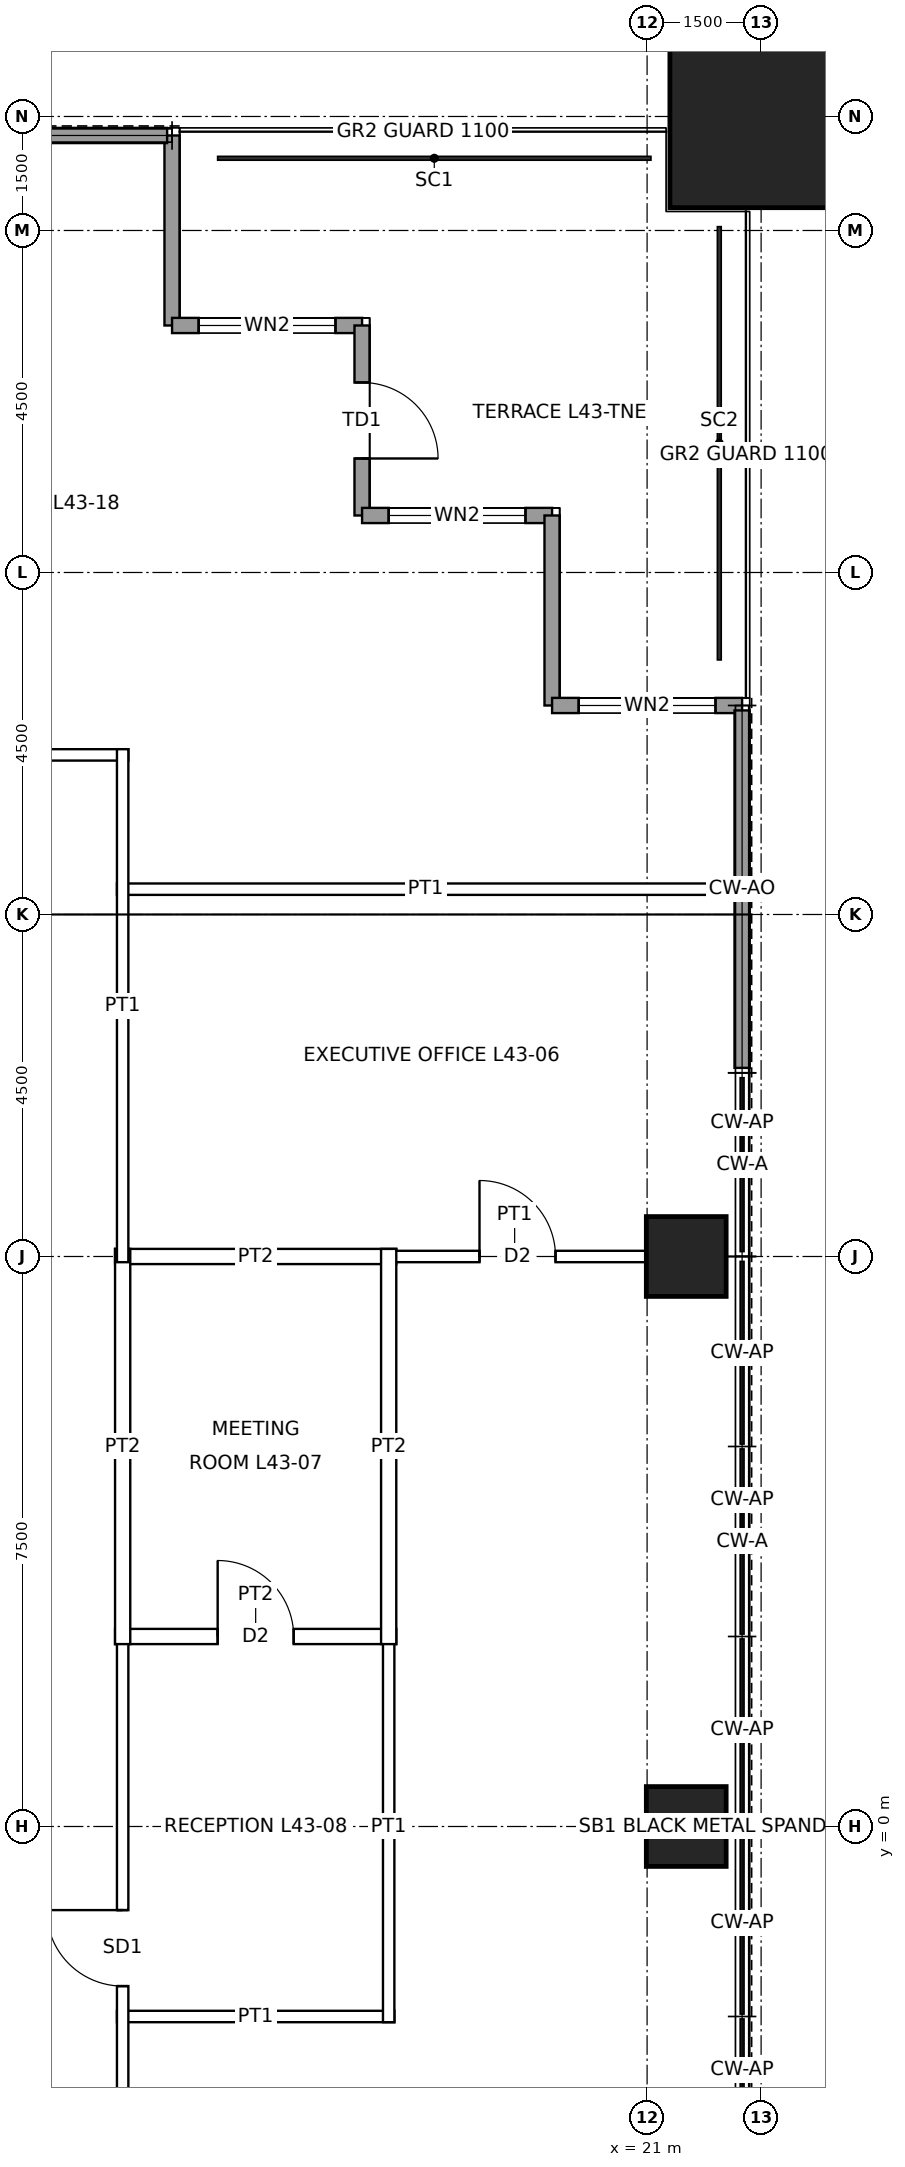
"""IFC4 building model, lengths in metres.
Left out: names, types, materials, properties, quantities, classifications, styles, units other than length and angle.
Written with IfcOpenShell. Run it as: python <this file> out.ifc"""

import sys

from ifc_helpers import new_model, si_unit, direction, frame, frame_2d, origin, origin_2d, place, context, subcontext, project, spatial, rectangle, hollow_rectangle, extrude, element, fill, save


model = new_model("IFC4")
c1 = context("Model", 3, precision=1e-05, world=origin(), true_north=direction((0.0, 1.0)))
c2 = subcontext(c1, "Body", "Model", "MODEL_VIEW")
j1 = project(units=[si_unit("LENGTHUNIT", "METRE"), si_unit("PLANEANGLEUNIT", "RADIAN")], contexts=[c1])
p1 = place(None, origin())
s1 = spatial("IfcSite", under=j1, at=p1, CompositionType="ELEMENT")
p2 = place(p1, origin())
s2 = spatial("IfcBuilding", under=s1, at=p2, CompositionType="ELEMENT")
p3 = place(p2, frame((0.0, 0.0, 205.9)))
s3 = spatial("IfcBuildingStorey", under=s2, at=p3, CompositionType="ELEMENT", Elevation=205.9)
p4 = place(p3, frame((22.5, 22.5, 0.0), z_axis=(0.0, 0.0, 1.0), x_axis=(1.0, 0.0, 0.0)))
e1 = element("IfcColumn", 1, at=p4, inside=s3, PredefinedType="COLUMN", context=c2, shape_type="SweptSolid", body=[
    extrude(hollow_rectangle(XDim=2.4, YDim=2.4, WallThickness=0.12, at=origin_2d()), origin(), (0.0, 0.0, 1.0), 4.0),
])
for number, where, z_axis, x_axis in (
    (2, (21.515, 7.5, 0.0), (0.0, 0.0, 1.0), (1.0, 0.0, 0.0)),
    (3, (21.515, 0.0, 0.0), (0.0, 0.0, 1.0), (1.0, 0.0, 0.0)),
):
    element("IfcColumn", number, at=place(p3, frame(where, z_axis=z_axis, x_axis=x_axis)), inside=s3, PredefinedType="COLUMN", context=c2, shape_type="SweptSolid", body=[
        extrude(hollow_rectangle(XDim=1.05, YDim=1.05, WallThickness=0.07, at=origin_2d()), origin(), (0.0, 0.0, 1.0), 4.0),
    ])
p5 = place(p3, frame((14.75, 22.25, 0.0), z_axis=(0.0, 0.0, 1.0), x_axis=(0.0, -1.0, 0.0)))
e4 = element("IfcWall", 4, at=p5, inside=s3, PredefinedType="SOLIDWALL", context=c2, shape_type="SweptSolid", body=[
    extrude(rectangle(XDim=2.5, YDim=0.2, at=frame_2d((1.25, 0.0))), origin(), (0.0, 0.0, 1.0), 3.85),
])
p6 = place(p3, frame((14.75, 19.75, 0.0), z_axis=(0.0, 0.0, 1.0), x_axis=(1.0, 0.0, 0.0)))
e5 = element("IfcWall", 5, at=p6, inside=s3, PredefinedType="SOLIDWALL", context=c2, shape_type="SweptSolid", body=[
    extrude(rectangle(XDim=2.5, YDim=0.2, at=frame_2d((1.25, 0.0))), origin(), (0.0, 0.0, 1.0), 3.85),
])
p7 = place(p6, frame((0.35, 0.0, 0.3)))
e6 = element("IfcOpeningElement", 6, at=p7, cuts=e5, PredefinedType="OPENING", context=c2, shape_type="SweptSolid", body=[
    extrude(rectangle(XDim=1.8, YDim=2.4, at=frame_2d((0.9, 1.2))), frame((0.0, 0.11, 0.0), z_axis=(0.0, -1.0, 0.0), x_axis=(1.0, 0.0, 0.0)), (0.0, 0.0, 1.0), 0.22),
])
p8 = place(p3, frame((17.25, 19.75, 0.0), z_axis=(0.0, 0.0, 1.0), x_axis=(0.0, -1.0, 0.0)))
e7 = element("IfcWall", 7, at=p8, inside=s3, PredefinedType="SOLIDWALL", context=c2, shape_type="SweptSolid", body=[
    extrude(rectangle(XDim=2.5, YDim=0.2, at=frame_2d((1.25, 0.0))), origin(), (0.0, 0.0, 1.0), 3.85),
])
p9 = place(p8, frame((0.75, 0.0, 0.0)))
e8 = element("IfcOpeningElement", 8, at=p9, cuts=e7, PredefinedType="OPENING", context=c2, shape_type="SweptSolid", body=[
    extrude(rectangle(XDim=1.0, YDim=2.4, at=frame_2d((0.5, 1.2))), frame((0.0, 0.11, 0.0), z_axis=(0.0, -1.0, 0.0), x_axis=(1.0, 0.0, 0.0)), (0.0, 0.0, 1.0), 0.22),
])
p10 = place(p3, frame((17.25, 17.25, 0.0), z_axis=(0.0, 0.0, 1.0), x_axis=(1.0, 0.0, 0.0)))
e9 = element("IfcWall", 9, at=p10, inside=s3, PredefinedType="SOLIDWALL", context=c2, shape_type="SweptSolid", body=[
    extrude(rectangle(XDim=2.5, YDim=0.2, at=frame_2d((1.25, 0.0))), origin(), (0.0, 0.0, 1.0), 3.85),
])
p11 = place(p10, frame((0.35, 0.0, 0.3)))
e10 = element("IfcOpeningElement", 10, at=p11, cuts=e9, PredefinedType="OPENING", context=c2, shape_type="SweptSolid", body=[
    extrude(rectangle(XDim=1.8, YDim=2.4, at=frame_2d((0.9, 1.2))), frame((0.0, 0.11, 0.0), z_axis=(0.0, -1.0, 0.0), x_axis=(1.0, 0.0, 0.0)), (0.0, 0.0, 1.0), 0.22),
])
p12 = place(p3, frame((19.75, 17.25, 0.0), z_axis=(0.0, 0.0, 1.0), x_axis=(0.0, -1.0, 0.0)))
e11 = element("IfcWall", 11, at=p12, inside=s3, PredefinedType="SOLIDWALL", context=c2, shape_type="SweptSolid", body=[
    extrude(rectangle(XDim=2.5, YDim=0.2, at=frame_2d((1.25, 0.0))), origin(), (0.0, 0.0, 1.0), 3.85),
])
p13 = place(p3, frame((19.75, 14.75, 0.0), z_axis=(0.0, 0.0, 1.0), x_axis=(1.0, 0.0, 0.0)))
e12 = element("IfcWall", 12, at=p13, inside=s3, PredefinedType="SOLIDWALL", context=c2, shape_type="SweptSolid", body=[
    extrude(rectangle(XDim=2.5, YDim=0.2, at=frame_2d((1.25, 0.0))), origin(), (0.0, 0.0, 1.0), 3.85),
])
p14 = place(p13, frame((0.35, 0.0, 0.3)))
e13 = element("IfcOpeningElement", 13, at=p14, cuts=e12, PredefinedType="OPENING", context=c2, shape_type="SweptSolid", body=[
    extrude(rectangle(XDim=1.8, YDim=2.4, at=frame_2d((0.9, 1.2))), frame((0.0, 0.11, 0.0), z_axis=(0.0, -1.0, 0.0), x_axis=(1.0, 0.0, 0.0)), (0.0, 0.0, 1.0), 0.22),
])
for number, where, z_axis, x_axis in (
    (14, (12.366, 22.25, 0.0), (0.0, 0.0, 1.0), (1.0, 0.0, 0.0)),
    (15, (22.25, 14.685, 0.0), (0.0, 0.0, 1.0), (0.0, -1.0, 0.0)),
    (16, (22.25, 12.301, 0.0), (0.0, 0.0, 1.0), (0.0, -1.0, 0.0)),
):
    element("IfcWall", number, at=place(p3, frame(where, z_axis=z_axis, x_axis=x_axis)), inside=s3, PredefinedType="SOLIDWALL", context=c2, shape_type="SweptSolid", body=[
        extrude(rectangle(XDim=2.319, YDim=0.2, at=frame_2d((1.16, 0.0))), origin(), (0.0, 0.0, 1.0), 3.85),
    ])
p15 = place(p3, frame((14.025, -2.5, 0.0), z_axis=(0.0, 0.0, 1.0), x_axis=(1.0, 0.0, 0.0)))
e17 = element("IfcWall", 17, at=p15, inside=s3, PredefinedType="PARTITIONING", context=c2, shape_type="SweptSolid", body=[
    extrude(rectangle(XDim=3.65, YDim=0.15, at=frame_2d((1.825, 0.0))), origin(), (0.0, 0.0, 1.0), 3.85),
])
p16 = place(p3, frame((14.0, 2.5, 0.0), z_axis=(0.0, 0.0, 1.0), x_axis=(1.0, 0.0, 0.0)))
e18 = element("IfcWall", 18, at=p16, inside=s3, PredefinedType="PARTITIONING", context=c2, shape_type="SweptSolid", body=[
    extrude(rectangle(XDim=3.7, YDim=0.2, at=frame_2d((1.85, 0.0))), origin(), (0.0, 0.0, 1.0), 3.85),
])
p17 = place(p16, frame((1.35, 0.0, 0.0)))
e19 = element("IfcOpeningElement", 19, at=p17, cuts=e18, PredefinedType="OPENING", context=c2, shape_type="SweptSolid", body=[
    extrude(rectangle(XDim=1.0, YDim=2.1, at=frame_2d((0.5, 1.05))), frame((0.0, 0.11, 0.0), z_axis=(0.0, -1.0, 0.0), x_axis=(1.0, 0.0, 0.0)), (0.0, 0.0, 1.0), 0.22),
])
p18 = place(p3, frame((14.0, 7.5, 0.0), z_axis=(0.0, 0.0, 1.0), x_axis=(1.0, 0.0, 0.0)))
e20 = element("IfcWall", 20, at=p18, inside=s3, PredefinedType="PARTITIONING", context=c2, shape_type="SweptSolid", body=[
    extrude(rectangle(XDim=3.7, YDim=0.2, at=frame_2d((1.85, 0.0))), origin(), (0.0, 0.0, 1.0), 3.238),
])
p19 = place(p3, frame((17.525, 7.5, 0.0), z_axis=(0.0, 0.0, 1.0), x_axis=(1.0, 0.0, 0.0)))
e21 = element("IfcWall", 21, at=p19, inside=s3, PredefinedType="PARTITIONING", context=c2, shape_type="SweptSolid", body=[
    extrude(rectangle(XDim=3.465, YDim=0.15, at=frame_2d((1.732, 0.0))), origin(), (0.0, 0.0, 1.0), 3.238),
])
p20 = place(p19, frame((1.27, 0.0, 0.0)))
e22 = element("IfcOpeningElement", 22, at=p20, cuts=e21, PredefinedType="OPENING", context=c2, shape_type="SweptSolid", body=[
    extrude(rectangle(XDim=1.0, YDim=2.1, at=frame_2d((0.5, 1.05))), frame((0.0, 0.085, 0.0), z_axis=(0.0, -1.0, 0.0), x_axis=(1.0, 0.0, 0.0)), (0.0, 0.0, 1.0), 0.17),
])
p21 = place(p3, frame((14.025, 12.333, 0.0), z_axis=(0.0, 0.0, 1.0), x_axis=(1.0, 0.0, 0.0)))
e23 = element("IfcWall", 23, at=p21, inside=s3, PredefinedType="PARTITIONING", context=c2, shape_type="SweptSolid", body=[
    extrude(rectangle(XDim=8.125, YDim=0.15, at=frame_2d((4.062, 0.0))), origin(), (0.0, 0.0, 1.0), 3.85),
])
p22 = place(p3, frame((-14.175, 14.1, 0.0), z_axis=(0.0, 0.0, 1.0), x_axis=(1.0, 0.0, 0.0)))
e24 = element("IfcWall", 24, at=p22, inside=s3, PredefinedType="PARTITIONING", context=c2, shape_type="SweptSolid", body=[
    extrude(rectangle(XDim=28.35, YDim=0.15, at=frame_2d((14.175, 0.0))), origin(), (0.0, 0.0, 1.0), 3.85),
])
p23 = place(p22, frame((13.675, 0.0, 0.0)))
e25 = element("IfcOpeningElement", 25, at=p23, cuts=e24, PredefinedType="OPENING", context=c2, shape_type="SweptSolid", body=[
    extrude(rectangle(XDim=1.0, YDim=2.4, at=frame_2d((0.5, 1.2))), frame((0.0, 0.085, 0.0), z_axis=(0.0, -1.0, 0.0), x_axis=(1.0, 0.0, 0.0)), (0.0, 0.0, 1.0), 0.17),
])
p24 = place(p22, frame((24.475, 0.0, 0.0)))
e26 = element("IfcOpeningElement", 26, at=p24, cuts=e24, PredefinedType="OPENING", context=c2, shape_type="SweptSolid", body=[
    extrude(rectangle(XDim=1.0, YDim=2.4, at=frame_2d((0.5, 1.2))), frame((0.0, 0.085, 0.0), z_axis=(0.0, -1.0, 0.0), x_axis=(1.0, 0.0, 0.0)), (0.0, 0.0, 1.0), 0.17),
])
p25 = place(p3, frame((14.1, -14.175, 0.0), z_axis=(0.0, 0.0, 1.0), x_axis=(0.0, 1.0, 0.0)))
e27 = element("IfcWall", 27, at=p25, inside=s3, PredefinedType="PARTITIONING", context=c2, shape_type="SweptSolid", body=[
    extrude(rectangle(XDim=16.75, YDim=0.15, at=frame_2d((8.375, 0.0))), origin(), (0.0, 0.0, 1.0), 3.85),
])
p26 = place(p25, frame((12.075, 0.0, 0.0)))
e28 = element("IfcOpeningElement", 28, at=p26, cuts=e27, PredefinedType="OPENING", context=c2, shape_type="SweptSolid", body=[
    extrude(rectangle(XDim=1.0, YDim=2.4, at=frame_2d((0.5, 1.2))), frame((0.0, 0.085, 0.0), z_axis=(0.0, -1.0, 0.0), x_axis=(1.0, 0.0, 0.0)), (0.0, 0.0, 1.0), 0.17),
])
p27 = place(p25, frame((5.375, 0.0, 0.0)))
e29 = element("IfcOpeningElement", 29, at=p27, cuts=e27, PredefinedType="OPENING", context=c2, shape_type="SweptSolid", body=[
    extrude(rectangle(XDim=1.0, YDim=2.4, at=frame_2d((0.5, 1.2))), frame((0.0, 0.085, 0.0), z_axis=(0.0, -1.0, 0.0), x_axis=(1.0, 0.0, 0.0)), (0.0, 0.0, 1.0), 0.17),
])
p28 = place(p3, frame((14.1, 2.4, 0.0), z_axis=(0.0, 0.0, 1.0), x_axis=(0.0, 1.0, 0.0)))
e30 = element("IfcWall", 30, at=p28, inside=s3, PredefinedType="PARTITIONING", context=c2, shape_type="SweptSolid", body=[
    extrude(rectangle(XDim=5.2, YDim=0.2, at=frame_2d((2.6, 0.0))), origin(), (0.0, 0.0, 1.0), 3.85),
])
p29 = place(p3, frame((14.1, 7.425, 0.0), z_axis=(0.0, 0.0, 1.0), x_axis=(0.0, 1.0, 0.0)))
e31 = element("IfcWall", 31, at=p29, inside=s3, PredefinedType="PARTITIONING", context=c2, shape_type="SweptSolid", body=[
    extrude(rectangle(XDim=6.75, YDim=0.15, at=frame_2d((3.375, 0.0))), origin(), (0.0, 0.0, 1.0), 3.85),
])
p30 = place(p3, frame((17.6, -2.575, 0.0), z_axis=(0.0, 0.0, 1.0), x_axis=(0.0, 1.0, 0.0)))
e32 = element("IfcWall", 32, at=p30, inside=s3, PredefinedType="PARTITIONING", context=c2, shape_type="SweptSolid", body=[
    extrude(rectangle(XDim=5.15, YDim=0.15, at=frame_2d((2.575, 0.0))), origin(), (0.0, 0.0, 1.0), 3.85),
])
p31 = place(p3, frame((17.6, 2.4, 0.0), z_axis=(0.0, 0.0, 1.0), x_axis=(0.0, 1.0, 0.0)))
e33 = element("IfcWall", 33, at=p31, inside=s3, PredefinedType="PARTITIONING", context=c2, shape_type="SweptSolid", body=[
    extrude(rectangle(XDim=5.2, YDim=0.2, at=frame_2d((2.6, 0.0))), origin(), (0.0, 0.0, 1.0), 3.85),
])
p32 = place(p7, origin())
e34 = element("IfcWindow", 34, at=p32, inside=s3, PartitioningType="SINGLE_PANEL", PredefinedType="WINDOW", context=c2, shape_type="SweptSolid", body=[
    extrude(rectangle(XDim=1.8, YDim=2.4, at=frame_2d((0.9, 1.2))), frame((0.0, 0.03, 0.0), z_axis=(0.0, -1.0, 0.0), x_axis=(1.0, 0.0, 0.0)), (0.0, 0.0, 1.0), 0.06),
])
fill(e6, e34)
p33 = place(p9, origin())
e35 = element("IfcDoor", 35, at=p33, inside=s3, OperationType="SINGLE_SWING_RIGHT", PredefinedType="DOOR", context=c2, shape_type="SweptSolid", body=[
    extrude(rectangle(XDim=1.0, YDim=2.4, at=frame_2d((0.5, 1.2))), frame((0.0, 0.025, 0.0), z_axis=(0.0, -1.0, 0.0), x_axis=(1.0, 0.0, 0.0)), (0.0, 0.0, 1.0), 0.05),
])
fill(e8, e35)
p34 = place(p11, origin())
e36 = element("IfcWindow", 36, at=p34, inside=s3, PartitioningType="SINGLE_PANEL", PredefinedType="WINDOW", context=c2, shape_type="SweptSolid", body=[
    extrude(rectangle(XDim=1.8, YDim=2.4, at=frame_2d((0.9, 1.2))), frame((0.0, 0.03, 0.0), z_axis=(0.0, -1.0, 0.0), x_axis=(1.0, 0.0, 0.0)), (0.0, 0.0, 1.0), 0.06),
])
fill(e10, e36)
p35 = place(p14, origin())
e37 = element("IfcWindow", 37, at=p35, inside=s3, PartitioningType="SINGLE_PANEL", PredefinedType="WINDOW", context=c2, shape_type="SweptSolid", body=[
    extrude(rectangle(XDim=1.8, YDim=2.4, at=frame_2d((0.9, 1.2))), frame((0.0, 0.03, 0.0), z_axis=(0.0, -1.0, 0.0), x_axis=(1.0, 0.0, 0.0)), (0.0, 0.0, 1.0), 0.06),
])
fill(e13, e37)
p36 = place(p20, origin())
e38 = element("IfcDoor", 38, at=p36, inside=s3, OperationType="SINGLE_SWING_LEFT", PredefinedType="DOOR", context=c2, shape_type="SweptSolid", body=[
    extrude(rectangle(XDim=1.0, YDim=2.1, at=frame_2d((0.5, 1.05))), frame((0.0, 0.025, 0.0), z_axis=(0.0, -1.0, 0.0), x_axis=(1.0, 0.0, 0.0)), (0.0, 0.0, 1.0), 0.05),
])
fill(e22, e38)
p37 = place(p17, origin())
e39 = element("IfcDoor", 39, at=p37, inside=s3, OperationType="SINGLE_SWING_LEFT", PredefinedType="DOOR", context=c2, shape_type="SweptSolid", body=[
    extrude(rectangle(XDim=1.0, YDim=2.1, at=frame_2d((0.5, 1.05))), frame((0.0, 0.025, 0.0), z_axis=(0.0, -1.0, 0.0), x_axis=(1.0, 0.0, 0.0)), (0.0, 0.0, 1.0), 0.05),
])
fill(e19, e39)
p38 = place(p26, origin())
e40 = element("IfcDoor", 40, at=p38, inside=s3, OperationType="SINGLE_SWING_RIGHT", PredefinedType="DOOR", context=c2, shape_type="SweptSolid", body=[
    extrude(rectangle(XDim=1.0, YDim=2.4, at=frame_2d((0.5, 1.2))), frame((0.0, 0.025, 0.0), z_axis=(0.0, -1.0, 0.0), x_axis=(1.0, 0.0, 0.0)), (0.0, 0.0, 1.0), 0.05),
])
fill(e28, e40)
save(model, sys.argv[1])
